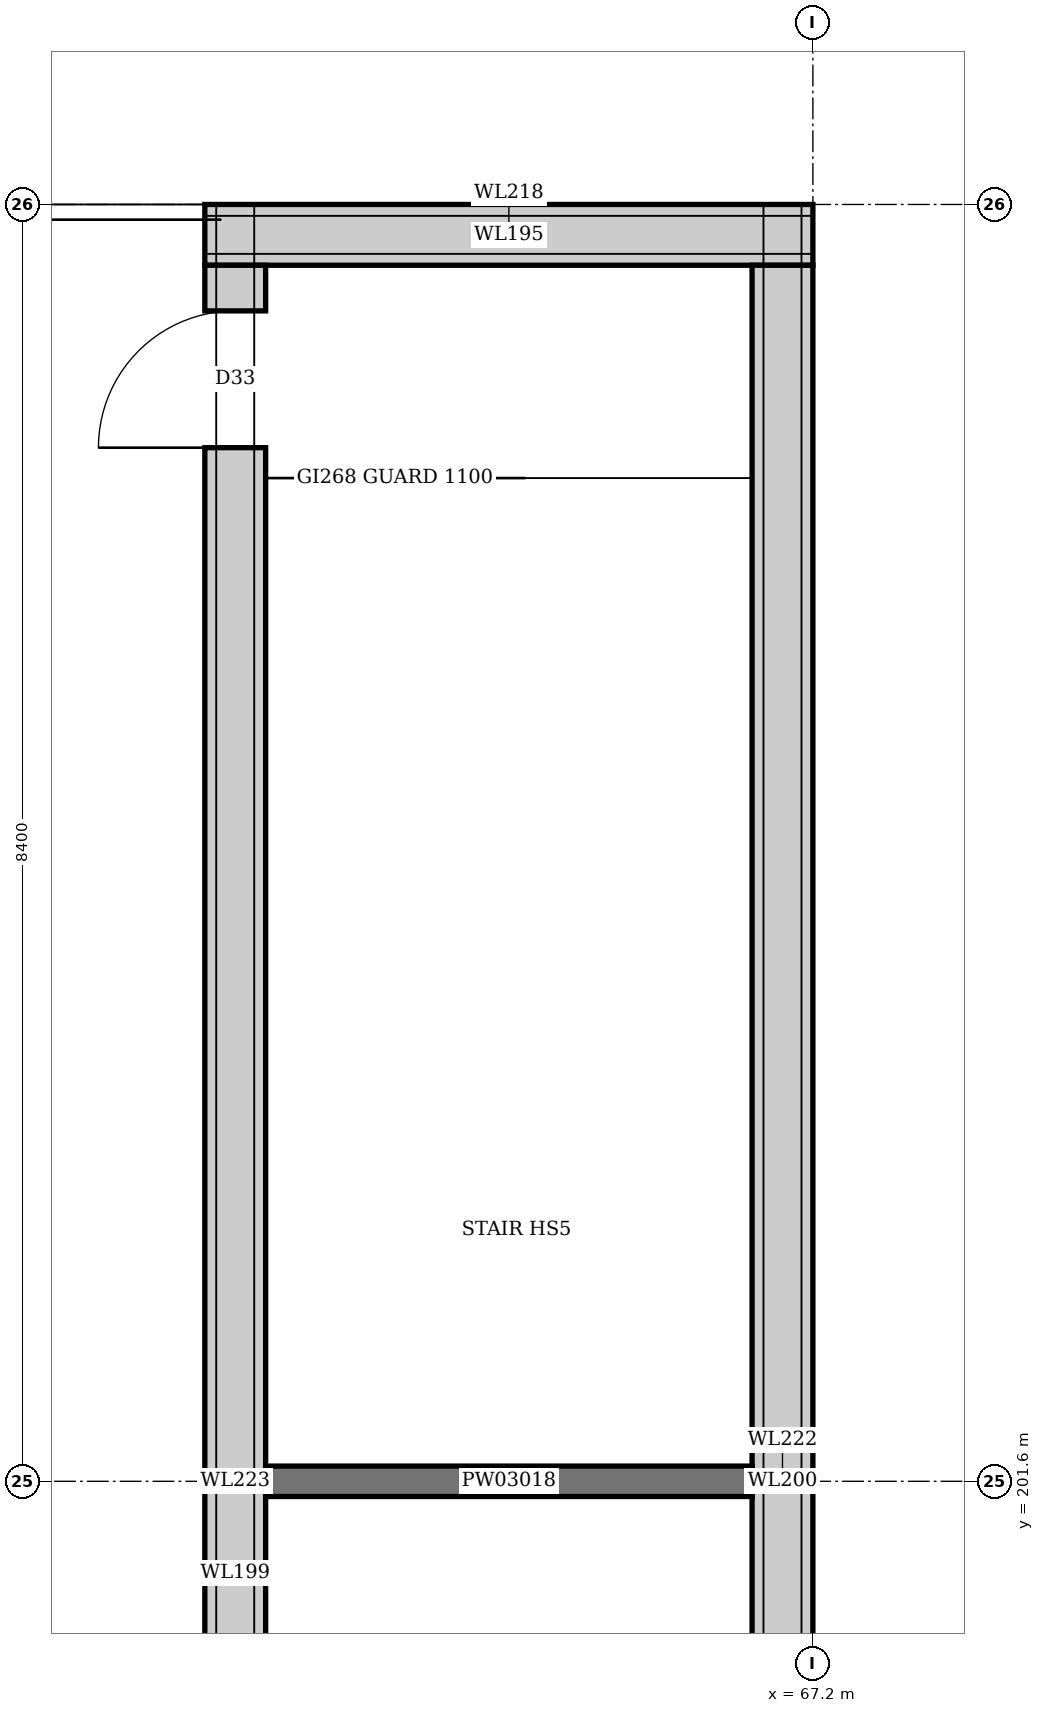
"""IFC4 building model, lengths in metres.
Left out: names, types, materials, properties, quantities, classifications, styles, units other than length and angle.
Written with IfcOpenShell. Run it as: python <this file> out.ifc"""

import sys

from ifc_helpers import new_model, si_unit, direction, frame, frame_2d, origin, place, context, subcontext, project, spatial, rectangle, extrude, element, fill, save


model = new_model("IFC4")
c1 = context("Model", 3, precision=1e-05, world=origin(), true_north=direction((0.0, 1.0)))
c2 = subcontext(c1, "Body", "Model", "MODEL_VIEW")
j1 = project(units=[si_unit("LENGTHUNIT", "METRE"), si_unit("PLANEANGLEUNIT", "RADIAN")], contexts=[c1])
p1 = place(None, origin())
s1 = spatial("IfcSite", under=j1, at=p1, CompositionType="ELEMENT")
p2 = place(p1, origin())
s2 = spatial("IfcBuilding", under=s1, at=p2, CompositionType="ELEMENT")
p3 = place(p2, frame((0.0, 0.0, 17.1)))
s3 = spatial("IfcBuildingStorey", under=s2, at=p3, CompositionType="ELEMENT", Elevation=17.1)
p4 = place(p3, frame((63.2, 209.8, 0.0), z_axis=(0.0, 0.0, 1.0), x_axis=(1.0, 0.0, 0.0)))
e1 = element("IfcWall", 1, at=p4, inside=s3, PredefinedType="SOLIDWALL", context=c2, shape_type="SweptSolid", body=[
    extrude(rectangle(XDim=4.0, YDim=0.4, at=frame_2d((2.0, 0.0))), origin(), (0.0, 0.0, 1.0), 3.0),
])
p5 = place(p3, frame((63.4, 193.6, 0.0), z_axis=(0.0, 0.0, 1.0), x_axis=(0.0, 1.0, 0.0)))
e2 = element("IfcWall", 2, at=p5, inside=s3, PredefinedType="SOLIDWALL", context=c2, shape_type="SweptSolid", body=[
    extrude(rectangle(XDim=16.0, YDim=0.4, at=frame_2d((8.0, 0.0))), origin(), (0.0, 0.0, 1.0), 3.0),
])
p6 = place(p5, frame((14.8, 0.0, 0.012)))
e3 = element("IfcOpeningElement", 3, at=p6, cuts=e2, PredefinedType="OPENING", context=c2, shape_type="SweptSolid", body=[
    extrude(rectangle(XDim=0.9, YDim=2.4, at=frame_2d((0.45, 1.2))), frame((0.0, 0.21, 0.0), z_axis=(0.0, -1.0, 0.0), x_axis=(1.0, 0.0, 0.0)), (0.0, 0.0, 1.0), 0.42),
])
p7 = place(p3, frame((67.0, 193.6, 0.0), z_axis=(0.0, 0.0, 1.0), x_axis=(0.0, 1.0, 0.0)))
e4 = element("IfcWall", 4, at=p7, inside=s3, PredefinedType="SOLIDWALL", context=c2, shape_type="SweptSolid", body=[
    extrude(rectangle(XDim=16.0, YDim=0.4, at=frame_2d((8.0, 0.0))), origin(), (0.0, 0.0, 1.0), 3.0),
])
p8 = place(p3, frame((63.2, 209.8, 3.0), z_axis=(0.0, 0.0, 1.0), x_axis=(1.0, 0.0, 0.0)))
e5 = element("IfcWall", 5, at=p8, inside=s3, PredefinedType="PARAPET", context=c2, shape_type="SweptSolid", body=[
    extrude(rectangle(XDim=4.0, YDim=0.25, at=frame_2d((2.0, 0.0))), origin(), (0.0, 0.0, 1.0), 1.1),
])
for number, where, z_axis, x_axis in (
    (6, (67.0, 193.2, 3.0), (0.0, 0.0, 1.0), (0.0, 1.0, 0.0)),
    (7, (63.4, 193.2, 3.0), (0.0, 0.0, 1.0), (0.0, 1.0, 0.0)),
):
    element("IfcWall", number, at=place(p3, frame(where, z_axis=z_axis, x_axis=x_axis)), inside=s3, PredefinedType="PARAPET", context=c2, shape_type="SweptSolid", body=[
        extrude(rectangle(XDim=16.8, YDim=0.25, at=frame_2d((8.4, 0.0))), origin(), (0.0, 0.0, 1.0), 1.1),
    ])
p9 = place(p3, frame((63.6, 201.6, 0.0), z_axis=(0.0, 0.0, 1.0), x_axis=(1.0, 0.0, 0.0)))
e8 = element("IfcWall", 8, at=p9, inside=s3, PredefinedType="PARTITIONING", context=c2, shape_type="SweptSolid", body=[
    extrude(rectangle(XDim=3.2, YDim=0.2, at=frame_2d((1.6, 0.0))), origin(), (0.0, 0.0, 1.0), 3.0),
])
p10 = place(p6, origin())
e9 = element("IfcDoor", 9, at=p10, inside=s3, OperationType="SINGLE_SWING_LEFT", PredefinedType="DOOR", context=c2, shape_type="SweptSolid", body=[
    extrude(rectangle(XDim=0.9, YDim=2.4, at=frame_2d((0.45, 1.2))), frame((0.0, 0.025, 0.0), z_axis=(0.0, -1.0, 0.0), x_axis=(1.0, 0.0, 0.0)), (0.0, 0.0, 1.0), 0.05),
])
fill(e3, e9)
save(model, sys.argv[1])
